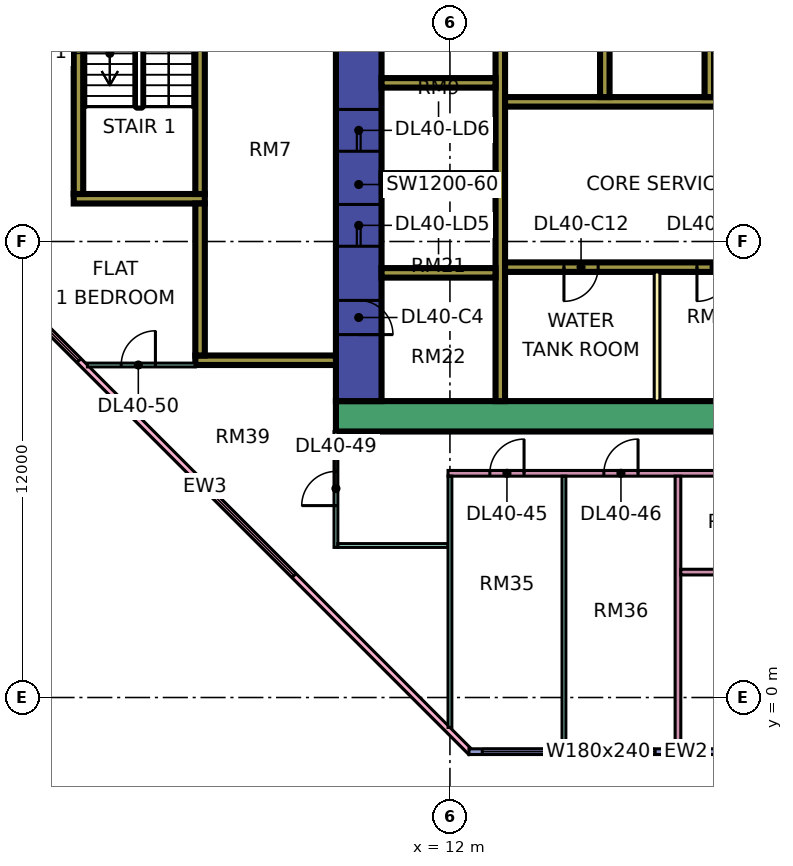
"""IFC4 building model, lengths in metres.
Left out: names, types, materials, properties, quantities, classifications, styles, units other than length and angle.
Written with IfcOpenShell. Run it as: python <this file> out.ifc"""

import sys

from ifc_helpers import new_model, si_unit, direction, frame, frame_2d, origin, place, context, subcontext, project, spatial, rectangle, extrude, element, fill, save


model = new_model("IFC4")
c1 = context("Model", 3, precision=1e-05, world=origin(), true_north=direction((0.0, 1.0)))
c2 = subcontext(c1, "Body", "Model", "MODEL_VIEW")
j1 = project(units=[si_unit("LENGTHUNIT", "METRE"), si_unit("PLANEANGLEUNIT", "RADIAN")], contexts=[c1])
p1 = place(None, origin())
s1 = spatial("IfcSite", under=j1, at=p1, CompositionType="ELEMENT")
p2 = place(p1, origin())
s2 = spatial("IfcBuilding", under=s1, at=p2, CompositionType="ELEMENT")
p3 = place(p2, frame((0.0, 0.0, 176.15)))
s3 = spatial("IfcBuildingStorey", under=s2, at=p3, CompositionType="ELEMENT", Elevation=176.15)
p4 = place(p3, frame((9.0, 7.4, 0.0), z_axis=(0.0, 0.0, 1.0), x_axis=(1.0, 0.0, 0.0)))
e1 = element("IfcWall", 1, at=p4, inside=s3, PredefinedType="SHEAR", context=c2, shape_type="SweptSolid", body=[
    extrude(rectangle(XDim=25.0, YDim=0.8, at=frame_2d((12.5, 0.0))), origin(), (0.0, 0.0, 1.0), 3.75),
])
p5 = place(p3, frame((9.6, 7.8, 0.0), z_axis=(0.0, 0.0, 1.0), x_axis=(0.0, 1.0, 0.0)))
e2 = element("IfcWall", 2, at=p5, inside=s3, PredefinedType="SHEAR", context=c2, shape_type="SweptSolid", body=[
    extrude(rectangle(XDim=11.4, YDim=1.2, at=frame_2d((5.7, 0.0))), origin(), (0.0, 0.0, 1.0), 3.75),
])
p6 = place(p5, frame((4.075, 0.0, 0.0)))
e3 = element("IfcOpeningElement", 3, at=p6, cuts=e2, PredefinedType="OPENING", context=c2, shape_type="SweptSolid", body=[
    extrude(rectangle(XDim=1.1, YDim=2.2, at=frame_2d((0.55, 1.1))), frame((0.0, 0.61, 0.0), z_axis=(0.0, -1.0, 0.0), x_axis=(1.0, 0.0, 0.0)), (0.0, 0.0, 1.0), 1.22),
])
p7 = place(p5, frame((6.575, 0.0, 0.0)))
e4 = element("IfcOpeningElement", 4, at=p7, cuts=e2, PredefinedType="OPENING", context=c2, shape_type="SweptSolid", body=[
    extrude(rectangle(XDim=1.1, YDim=2.2, at=frame_2d((0.55, 1.1))), frame((0.0, 0.61, 0.0), z_axis=(0.0, -1.0, 0.0), x_axis=(1.0, 0.0, 0.0)), (0.0, 0.0, 1.0), 1.22),
])
p8 = place(p5, frame((9.4, 0.0, 0.0)))
e5 = element("IfcOpeningElement", 5, at=p8, cuts=e2, PredefinedType="OPENING", context=c2, shape_type="SweptSolid", body=[
    extrude(rectangle(XDim=1.1, YDim=2.2, at=frame_2d((0.55, 1.1))), frame((0.0, 0.61, 0.0), z_axis=(0.0, -1.0, 0.0), x_axis=(1.0, 0.0, 0.0)), (0.0, 0.0, 1.0), 1.22),
])
p9 = place(p5, frame((1.75, 0.0, 0.0)))
e6 = element("IfcOpeningElement", 6, at=p9, cuts=e2, PredefinedType="OPENING", context=c2, shape_type="SweptSolid", body=[
    extrude(rectangle(XDim=0.9, YDim=2.1, at=frame_2d((0.45, 1.05))), frame((0.0, 0.61, 0.0), z_axis=(0.0, -1.0, 0.0), x_axis=(1.0, 0.0, 0.0)), (0.0, 0.0, 1.0), 1.22),
])
p10 = place(p3, frame((13.325, 7.8, 0.0), z_axis=(0.0, 0.0, 1.0), x_axis=(0.0, 1.0, 0.0)))
e7 = element("IfcWall", 7, at=p10, inside=s3, PredefinedType="SHEAR", context=c2, shape_type="SweptSolid", body=[
    extrude(rectangle(XDim=11.4, YDim=0.25, at=frame_2d((5.7, 0.0))), origin(), (0.0, 0.0, 1.0), 3.75),
])
p11 = place(p3, frame((13.45, 11.325, 0.0), z_axis=(0.0, 0.0, 1.0), x_axis=(1.0, 0.0, 0.0)))
e8 = element("IfcWall", 8, at=p11, inside=s3, PredefinedType="SHEAR", context=c2, shape_type="SweptSolid", body=[
    extrude(rectangle(XDim=19.75, YDim=0.25, at=frame_2d((9.875, 0.0))), origin(), (0.0, 0.0, 1.0), 3.75),
])
p12 = place(p11, frame((11.65, 0.0, 0.0)))
e9 = element("IfcOpeningElement", 9, at=p12, cuts=e8, PredefinedType="OPENING", context=c2, shape_type="SweptSolid", body=[
    extrude(rectangle(XDim=1.2, YDim=2.2, at=frame_2d((0.6, 1.1))), frame((0.0, 0.135, 0.0), z_axis=(0.0, -1.0, 0.0), x_axis=(1.0, 0.0, 0.0)), (0.0, 0.0, 1.0), 0.27),
])
p13 = place(p11, frame((14.4, 0.0, 0.0)))
e10 = element("IfcOpeningElement", 10, at=p13, cuts=e8, PredefinedType="OPENING", context=c2, shape_type="SweptSolid", body=[
    extrude(rectangle(XDim=1.2, YDim=2.2, at=frame_2d((0.6, 1.1))), frame((0.0, 0.135, 0.0), z_axis=(0.0, -1.0, 0.0), x_axis=(1.0, 0.0, 0.0)), (0.0, 0.0, 1.0), 0.27),
])
p14 = place(p11, frame((17.15, 0.0, 0.0)))
e11 = element("IfcOpeningElement", 11, at=p14, cuts=e8, PredefinedType="OPENING", context=c2, shape_type="SweptSolid", body=[
    extrude(rectangle(XDim=1.2, YDim=2.2, at=frame_2d((0.6, 1.1))), frame((0.0, 0.135, 0.0), z_axis=(0.0, -1.0, 0.0), x_axis=(1.0, 0.0, 0.0)), (0.0, 0.0, 1.0), 0.27),
])
p15 = place(p11, frame((1.55, 0.0, 0.0)))
e12 = element("IfcOpeningElement", 12, at=p15, cuts=e8, PredefinedType="OPENING", context=c2, shape_type="SweptSolid", body=[
    extrude(rectangle(XDim=0.9, YDim=2.1, at=frame_2d((0.45, 1.05))), frame((0.0, 0.135, 0.0), z_axis=(0.0, -1.0, 0.0), x_axis=(1.0, 0.0, 0.0)), (0.0, 0.0, 1.0), 0.27),
])
p16 = place(p11, frame((5.05, 0.0, 0.0)))
e13 = element("IfcOpeningElement", 13, at=p16, cuts=e8, PredefinedType="OPENING", context=c2, shape_type="SweptSolid", body=[
    extrude(rectangle(XDim=0.9, YDim=2.1, at=frame_2d((0.45, 1.05))), frame((0.0, 0.135, 0.0), z_axis=(0.0, -1.0, 0.0), x_axis=(1.0, 0.0, 0.0)), (0.0, 0.0, 1.0), 0.27),
])
p17 = place(p11, frame((8.425, 0.0, 0.0)))
e14 = element("IfcOpeningElement", 14, at=p17, cuts=e8, PredefinedType="OPENING", context=c2, shape_type="SweptSolid", body=[
    extrude(rectangle(XDim=0.9, YDim=2.1, at=frame_2d((0.45, 1.05))), frame((0.0, 0.135, 0.0), z_axis=(0.0, -1.0, 0.0), x_axis=(1.0, 0.0, 0.0)), (0.0, 0.0, 1.0), 0.27),
])
p18 = place(p3, frame((13.45, 15.675, 0.0), z_axis=(0.0, 0.0, 1.0), x_axis=(1.0, 0.0, 0.0)))
e15 = element("IfcWall", 15, at=p18, inside=s3, PredefinedType="SHEAR", context=c2, shape_type="SweptSolid", body=[
    extrude(rectangle(XDim=13.75, YDim=0.25, at=frame_2d((6.875, 0.0))), origin(), (0.0, 0.0, 1.0), 3.75),
])
p19 = place(p18, frame((11.65, 0.0, 0.0)))
e16 = element("IfcOpeningElement", 16, at=p19, cuts=e15, PredefinedType="OPENING", context=c2, shape_type="SweptSolid", body=[
    extrude(rectangle(XDim=1.2, YDim=2.2, at=frame_2d((0.6, 1.1))), frame((0.0, 0.135, 0.0), z_axis=(0.0, -1.0, 0.0), x_axis=(1.0, 0.0, 0.0)), (0.0, 0.0, 1.0), 0.27),
])
for number, where, z_axis, x_axis in (
    (17, (10.2, 11.175, 0.0), (0.0, 0.0, 1.0), (1.0, 0.0, 0.0)),
    (18, (10.2, 13.675, 0.0), (0.0, 0.0, 1.0), (1.0, 0.0, 0.0)),
    (19, (10.2, 16.175, 0.0), (0.0, 0.0, 1.0), (1.0, 0.0, 0.0)),
):
    element("IfcWall", number, at=place(p3, frame(where, z_axis=z_axis, x_axis=x_axis)), inside=s3, PredefinedType="SHEAR", context=c2, shape_type="SweptSolid", body=[
        extrude(rectangle(XDim=3.0, YDim=0.25, at=frame_2d((1.5, 0.0))), origin(), (0.0, 0.0, 1.0), 3.75),
    ])
for number, where, z_axis, x_axis in (
    (20, (16.075, 15.8, 0.0), (0.0, 0.0, 1.0), (0.0, 1.0, 0.0)),
    (21, (18.825, 15.8, 0.0), (0.0, 0.0, 1.0), (0.0, 1.0, 0.0)),
):
    element("IfcWall", number, at=place(p3, frame(where, z_axis=z_axis, x_axis=x_axis)), inside=s3, PredefinedType="SHEAR", context=c2, shape_type="SweptSolid", body=[
        extrude(rectangle(XDim=3.4, YDim=0.25, at=frame_2d((1.7, 0.0))), origin(), (0.0, 0.0, 1.0), 3.75),
    ])
p20 = place(p3, frame((2.1, 13.125, 0.0), z_axis=(0.0, 0.0, 1.0), x_axis=(1.0, 0.0, 0.0)))
e22 = element("IfcWall", 22, at=p20, inside=s3, PredefinedType="SHEAR", context=c2, shape_type="SweptSolid", body=[
    extrude(rectangle(XDim=3.45, YDim=0.25, at=frame_2d((1.725, 0.0))), origin(), (0.0, 0.0, 1.0), 3.75),
])
p21 = place(p3, frame((2.225, 13.25, 0.0), z_axis=(0.0, 0.0, 1.0), x_axis=(0.0, 1.0, 0.0)))
e23 = element("IfcWall", 23, at=p21, inside=s3, PredefinedType="SHEAR", context=c2, shape_type="SweptSolid", body=[
    extrude(rectangle(XDim=6.5, YDim=0.25, at=frame_2d((3.25, 0.0))), origin(), (0.0, 0.0, 1.0), 3.75),
])
p22 = place(p3, frame((5.425, 13.25, 0.0), z_axis=(0.0, 0.0, 1.0), x_axis=(0.0, 1.0, 0.0)))
e24 = element("IfcWall", 24, at=p22, inside=s3, PredefinedType="SHEAR", context=c2, shape_type="SweptSolid", body=[
    extrude(rectangle(XDim=6.5, YDim=0.25, at=frame_2d((3.25, 0.0))), origin(), (0.0, 0.0, 1.0), 3.75),
])
p23 = place(p22, frame((5.25, 0.0, 0.0)))
e25 = element("IfcOpeningElement", 25, at=p23, cuts=e24, PredefinedType="OPENING", context=c2, shape_type="SweptSolid", body=[
    extrude(rectangle(XDim=1.1, YDim=2.2, at=frame_2d((0.55, 1.1))), frame((0.0, 0.135, 0.0), z_axis=(0.0, -1.0, 0.0), x_axis=(1.0, 0.0, 0.0)), (0.0, 0.0, 1.0), 0.27),
])
p24 = place(p3, frame((5.3, 8.875, 0.0), z_axis=(0.0, 0.0, 1.0), x_axis=(1.0, 0.0, 0.0)))
e26 = element("IfcWall", 26, at=p24, inside=s3, PredefinedType="SHEAR", context=c2, shape_type="SweptSolid", body=[
    extrude(rectangle(XDim=3.7, YDim=0.25, at=frame_2d((1.85, 0.0))), origin(), (0.0, 0.0, 1.0), 3.75),
])
p25 = place(p3, frame((5.425, 9.0, 0.0), z_axis=(0.0, 0.0, 1.0), x_axis=(0.0, 1.0, 0.0)))
e27 = element("IfcWall", 27, at=p25, inside=s3, PredefinedType="SHEAR", context=c2, shape_type="SweptSolid", body=[
    extrude(rectangle(XDim=4.0, YDim=0.25, at=frame_2d((2.0, 0.0))), origin(), (0.0, 0.0, 1.0), 3.75),
])
p26 = place(p3, frame((-1.447, 12.553, 0.0), z_axis=(0.0, 0.0, 1.0), x_axis=(0.707106781187, -0.707106781187, 0.0)))
e28 = element("IfcWall", 28, at=p26, inside=s3, PredefinedType="SOLIDWALL", context=c2, shape_type="SweptSolid", body=[
    extrude(rectangle(XDim=19.799, YDim=0.15, at=frame_2d((9.899, 0.0))), origin(), (0.0, 0.0, 1.0), 3.35),
])
p27 = place(p26, frame((2.212, 0.0, 0.45)))
e29 = element("IfcOpeningElement", 29, at=p27, cuts=e28, PredefinedType="OPENING", context=c2, shape_type="SweptSolid", body=[
    extrude(rectangle(XDim=3.0, YDim=2.4, at=frame_2d((1.5, 1.2))), frame((0.0, 0.085, 0.0), z_axis=(0.0, -1.0, 0.0), x_axis=(1.0, 0.0, 0.0)), (0.0, 0.0, 1.0), 0.17),
])
p28 = place(p26, frame((10.216, 0.0, 0.45)))
e30 = element("IfcOpeningElement", 30, at=p28, cuts=e28, PredefinedType="OPENING", context=c2, shape_type="SweptSolid", body=[
    extrude(rectangle(XDim=3.0, YDim=2.4, at=frame_2d((1.5, 1.2))), frame((0.0, 0.085, 0.0), z_axis=(0.0, -1.0, 0.0), x_axis=(1.0, 0.0, 0.0)), (0.0, 0.0, 1.0), 0.17),
])
p29 = place(p3, frame((12.5, -1.425, 0.0), z_axis=(0.0, 0.0, 1.0), x_axis=(1.0, 0.0, 0.0)))
e31 = element("IfcWall", 31, at=p29, inside=s3, PredefinedType="SOLIDWALL", context=c2, shape_type="SweptSolid", body=[
    extrude(rectangle(XDim=11.425, YDim=0.15, at=frame_2d((5.712, 0.0))), origin(), (0.0, 0.0, 1.0), 3.35),
])
p30 = place(p29, frame((0.35, 0.0, 0.45)))
e32 = element("IfcOpeningElement", 32, at=p30, cuts=e31, PredefinedType="OPENING", context=c2, shape_type="SweptSolid", body=[
    extrude(rectangle(XDim=1.8, YDim=2.4, at=frame_2d((0.9, 1.2))), frame((0.0, 0.085, 0.0), z_axis=(0.0, -1.0, 0.0), x_axis=(1.0, 0.0, 0.0)), (0.0, 0.0, 1.0), 0.17),
])
p31 = place(p29, frame((3.1, 0.0, 0.45)))
e33 = element("IfcOpeningElement", 33, at=p31, cuts=e31, PredefinedType="OPENING", context=c2, shape_type="SweptSolid", body=[
    extrude(rectangle(XDim=1.8, YDim=2.4, at=frame_2d((0.9, 1.2))), frame((0.0, 0.085, 0.0), z_axis=(0.0, -1.0, 0.0), x_axis=(1.0, 0.0, 0.0)), (0.0, 0.0, 1.0), 0.17),
])
p32 = place(p29, frame((6.962, 0.0, 0.45)))
e34 = element("IfcOpeningElement", 34, at=p32, cuts=e31, PredefinedType="OPENING", context=c2, shape_type="SweptSolid", body=[
    extrude(rectangle(XDim=3.0, YDim=2.4, at=frame_2d((1.5, 1.2))), frame((0.0, 0.085, 0.0), z_axis=(0.0, -1.0, 0.0), x_axis=(1.0, 0.0, 0.0)), (0.0, 0.0, 1.0), 0.17),
])
p33 = place(p3, frame((17.45, 7.8, 0.0), z_axis=(0.0, 0.0, 1.0), x_axis=(0.0, 1.0, 0.0)))
e35 = element("IfcWall", 35, at=p33, inside=s3, PredefinedType="PARTITIONING", context=c2, shape_type="SweptSolid", body=[
    extrude(rectangle(XDim=3.4, YDim=0.15, at=frame_2d((1.7, 0.0))), origin(), (0.0, 0.0, 1.0), 3.35),
])
p34 = place(p3, frame((2.461, 8.75, 0.0), z_axis=(0.0, 0.0, 1.0), x_axis=(1.0, 0.0, 0.0)))
e36 = element("IfcWall", 36, at=p34, inside=s3, PredefinedType="PARTITIONING", context=c2, shape_type="SweptSolid", body=[
    extrude(rectangle(XDim=2.839, YDim=0.1, at=frame_2d((1.419, 0.0))), origin(), (0.0, 0.0, 1.0), 3.35),
])
p35 = place(p34, frame((0.889, 0.0, 0.0)))
e37 = element("IfcOpeningElement", 37, at=p35, cuts=e36, PredefinedType="OPENING", context=c2, shape_type="SweptSolid", body=[
    extrude(rectangle(XDim=0.9, YDim=2.1, at=frame_2d((0.45, 1.05))), frame((0.0, 0.06, 0.0), z_axis=(0.0, -1.0, 0.0), x_axis=(1.0, 0.0, 0.0)), (0.0, 0.0, 1.0), 0.12),
])
p36 = place(p3, frame((9.0, 3.95, 0.0), z_axis=(0.0, 0.0, 1.0), x_axis=(0.0, 1.0, 0.0)))
e38 = element("IfcWall", 38, at=p36, inside=s3, PredefinedType="PARTITIONING", context=c2, shape_type="SweptSolid", body=[
    extrude(rectangle(XDim=3.05, YDim=0.1, at=frame_2d((1.525, 0.0))), origin(), (0.0, 0.0, 1.0), 3.35),
])
p37 = place(p36, frame((1.1, 0.0, 0.0)))
e39 = element("IfcOpeningElement", 39, at=p37, cuts=e38, PredefinedType="OPENING", context=c2, shape_type="SweptSolid", body=[
    extrude(rectangle(XDim=0.9, YDim=2.1, at=frame_2d((0.45, 1.05))), frame((0.0, 0.06, 0.0), z_axis=(0.0, -1.0, 0.0), x_axis=(1.0, 0.0, 0.0)), (0.0, 0.0, 1.0), 0.12),
])
p38 = place(p3, frame((9.05, 4.0, 0.0), z_axis=(0.0, 0.0, 1.0), x_axis=(1.0, 0.0, 0.0)))
e40 = element("IfcWall", 40, at=p38, inside=s3, PredefinedType="PARTITIONING", context=c2, shape_type="SweptSolid", body=[
    extrude(rectangle(XDim=2.9, YDim=0.1, at=frame_2d((1.45, 0.0))), origin(), (0.0, 0.0, 1.0), 3.35),
])
p39 = place(p3, frame((11.95, 5.9, 0.0), z_axis=(0.0, 0.0, 1.0), x_axis=(1.0, 0.0, 0.0)))
e41 = element("IfcWall", 41, at=p39, inside=s3, PredefinedType="PARTITIONING", context=c2, shape_type="SweptSolid", body=[
    extrude(rectangle(XDim=21.1, YDim=0.15, at=frame_2d((10.55, 0.0))), origin(), (0.0, 0.0, 1.0), 3.35),
])
p40 = place(p39, frame((1.1, 0.0, 0.0)))
e42 = element("IfcOpeningElement", 42, at=p40, cuts=e41, PredefinedType="OPENING", context=c2, shape_type="SweptSolid", body=[
    extrude(rectangle(XDim=0.9, YDim=2.1, at=frame_2d((0.45, 1.05))), frame((0.0, 0.085, 0.0), z_axis=(0.0, -1.0, 0.0), x_axis=(1.0, 0.0, 0.0)), (0.0, 0.0, 1.0), 0.17),
])
p41 = place(p39, frame((4.1, 0.0, 0.0)))
e43 = element("IfcOpeningElement", 43, at=p41, cuts=e41, PredefinedType="OPENING", context=c2, shape_type="SweptSolid", body=[
    extrude(rectangle(XDim=0.9, YDim=2.1, at=frame_2d((0.45, 1.05))), frame((0.0, 0.085, 0.0), z_axis=(0.0, -1.0, 0.0), x_axis=(1.0, 0.0, 0.0)), (0.0, 0.0, 1.0), 0.17),
])
p42 = place(p39, frame((10.1, 0.0, 0.0)))
e44 = element("IfcOpeningElement", 44, at=p42, cuts=e41, PredefinedType="OPENING", context=c2, shape_type="SweptSolid", body=[
    extrude(rectangle(XDim=0.9, YDim=2.1, at=frame_2d((0.45, 1.05))), frame((0.0, 0.085, 0.0), z_axis=(0.0, -1.0, 0.0), x_axis=(1.0, 0.0, 0.0)), (0.0, 0.0, 1.0), 0.17),
])
p43 = place(p39, frame((16.1, 0.0, 0.0)))
e45 = element("IfcOpeningElement", 45, at=p43, cuts=e41, PredefinedType="OPENING", context=c2, shape_type="SweptSolid", body=[
    extrude(rectangle(XDim=0.9, YDim=2.1, at=frame_2d((0.45, 1.05))), frame((0.0, 0.085, 0.0), z_axis=(0.0, -1.0, 0.0), x_axis=(1.0, 0.0, 0.0)), (0.0, 0.0, 1.0), 0.17),
])
p44 = place(p3, frame((12.0, -0.788, 0.0), z_axis=(0.0, 0.0, 1.0), x_axis=(0.0, 1.0, 0.0)))
e46 = element("IfcWall", 46, at=p44, inside=s3, PredefinedType="PARTITIONING", context=c2, shape_type="SweptSolid", body=[
    extrude(rectangle(XDim=6.613, YDim=0.1, at=frame_2d((3.306, 0.0))), origin(), (0.0, 0.0, 1.0), 3.35),
])
p45 = place(p3, frame((15.0, -1.351, 0.0), z_axis=(0.0, 0.0, 1.0), x_axis=(0.0, 1.0, 0.0)))
e47 = element("IfcWall", 47, at=p45, inside=s3, PredefinedType="PARTITIONING", context=c2, shape_type="SweptSolid", body=[
    extrude(rectangle(XDim=7.176, YDim=0.1, at=frame_2d((3.588, 0.0))), origin(), (0.0, 0.0, 1.0), 3.35),
])
p46 = place(p3, frame((18.0, -1.351, 0.0), z_axis=(0.0, 0.0, 1.0), x_axis=(0.0, 1.0, 0.0)))
e48 = element("IfcWall", 48, at=p46, inside=s3, PredefinedType="PARTITIONING", context=c2, shape_type="SweptSolid", body=[
    extrude(rectangle(XDim=7.176, YDim=0.15, at=frame_2d((3.588, 0.0))), origin(), (0.0, 0.0, 1.0), 3.35),
])
p47 = place(p3, frame((18.075, 3.3, 0.0), z_axis=(0.0, 0.0, 1.0), x_axis=(1.0, 0.0, 0.0)))
e49 = element("IfcWall", 49, at=p47, inside=s3, PredefinedType="PARTITIONING", context=c2, shape_type="SweptSolid", body=[
    extrude(rectangle(XDim=3.0, YDim=0.15, at=frame_2d((1.5, 0.0))), origin(), (0.0, 0.0, 1.0), 3.35),
])
p48 = place(p27, origin())
e50 = element("IfcWindow", 50, at=p48, inside=s3, PartitioningType="SINGLE_PANEL", PredefinedType="WINDOW", context=c2, shape_type="SweptSolid", body=[
    extrude(rectangle(XDim=3.0, YDim=2.4, at=frame_2d((1.5, 1.2))), frame((0.0, 0.03, 0.0), z_axis=(0.0, -1.0, 0.0), x_axis=(1.0, 0.0, 0.0)), (0.0, 0.0, 1.0), 0.06),
])
fill(e29, e50)
p49 = place(p28, origin())
e51 = element("IfcWindow", 51, at=p49, inside=s3, PartitioningType="SINGLE_PANEL", PredefinedType="WINDOW", context=c2, shape_type="SweptSolid", body=[
    extrude(rectangle(XDim=3.0, YDim=2.4, at=frame_2d((1.5, 1.2))), frame((0.0, 0.03, 0.0), z_axis=(0.0, -1.0, 0.0), x_axis=(1.0, 0.0, 0.0)), (0.0, 0.0, 1.0), 0.06),
])
fill(e30, e51)
p50 = place(p30, origin())
e52 = element("IfcWindow", 52, at=p50, inside=s3, PartitioningType="SINGLE_PANEL", PredefinedType="WINDOW", context=c2, shape_type="SweptSolid", body=[
    extrude(rectangle(XDim=1.8, YDim=2.4, at=frame_2d((0.9, 1.2))), frame((0.0, 0.03, 0.0), z_axis=(0.0, -1.0, 0.0), x_axis=(1.0, 0.0, 0.0)), (0.0, 0.0, 1.0), 0.06),
])
fill(e32, e52)
p51 = place(p31, origin())
e53 = element("IfcWindow", 53, at=p51, inside=s3, PartitioningType="SINGLE_PANEL", PredefinedType="WINDOW", context=c2, shape_type="SweptSolid", body=[
    extrude(rectangle(XDim=1.8, YDim=2.4, at=frame_2d((0.9, 1.2))), frame((0.0, 0.03, 0.0), z_axis=(0.0, -1.0, 0.0), x_axis=(1.0, 0.0, 0.0)), (0.0, 0.0, 1.0), 0.06),
])
fill(e33, e53)
p52 = place(p6, origin())
e54 = element("IfcDoor", 54, at=p52, inside=s3, OperationType="DOUBLE_DOOR_SLIDING", PredefinedType="DOOR", context=c2, shape_type="SweptSolid", body=[
    extrude(rectangle(XDim=1.1, YDim=2.2, at=frame_2d((0.55, 1.1))), frame((0.0, 0.025, 0.0), z_axis=(0.0, -1.0, 0.0), x_axis=(1.0, 0.0, 0.0)), (0.0, 0.0, 1.0), 0.05),
])
fill(e3, e54)
p53 = place(p7, origin())
e55 = element("IfcDoor", 55, at=p53, inside=s3, OperationType="DOUBLE_DOOR_SLIDING", PredefinedType="DOOR", context=c2, shape_type="SweptSolid", body=[
    extrude(rectangle(XDim=1.1, YDim=2.2, at=frame_2d((0.55, 1.1))), frame((0.0, 0.025, 0.0), z_axis=(0.0, -1.0, 0.0), x_axis=(1.0, 0.0, 0.0)), (0.0, 0.0, 1.0), 0.05),
])
fill(e4, e55)
p54 = place(p9, frame((0.9, 0.0, 0.0), z_axis=(0.0, 0.0, 1.0), x_axis=(-1.0, 0.0, 0.0)))
e56 = element("IfcDoor", 56, at=p54, inside=s3, OperationType="SINGLE_SWING_LEFT", PredefinedType="DOOR", context=c2, shape_type="SweptSolid", body=[
    extrude(rectangle(XDim=0.9, YDim=2.1, at=frame_2d((0.45, 1.05))), frame((0.0, 0.025, 0.0), z_axis=(0.0, -1.0, 0.0), x_axis=(1.0, 0.0, 0.0)), (0.0, 0.0, 1.0), 0.05),
])
fill(e6, e56)
p55 = place(p15, frame((0.9, 0.0, 0.0), z_axis=(0.0, 0.0, 1.0), x_axis=(-1.0, 0.0, 0.0)))
e57 = element("IfcDoor", 57, at=p55, inside=s3, OperationType="SINGLE_SWING_LEFT", PredefinedType="DOOR", context=c2, shape_type="SweptSolid", body=[
    extrude(rectangle(XDim=0.9, YDim=2.1, at=frame_2d((0.45, 1.05))), frame((0.0, 0.025, 0.0), z_axis=(0.0, -1.0, 0.0), x_axis=(1.0, 0.0, 0.0)), (0.0, 0.0, 1.0), 0.05),
])
fill(e12, e57)
p56 = place(p16, frame((0.9, 0.0, 0.0), z_axis=(0.0, 0.0, 1.0), x_axis=(-1.0, 0.0, 0.0)))
e58 = element("IfcDoor", 58, at=p56, inside=s3, OperationType="SINGLE_SWING_LEFT", PredefinedType="DOOR", context=c2, shape_type="SweptSolid", body=[
    extrude(rectangle(XDim=0.9, YDim=2.1, at=frame_2d((0.45, 1.05))), frame((0.0, 0.025, 0.0), z_axis=(0.0, -1.0, 0.0), x_axis=(1.0, 0.0, 0.0)), (0.0, 0.0, 1.0), 0.05),
])
fill(e13, e58)
p57 = place(p40, frame((0.9, 0.0, 0.0), z_axis=(0.0, 0.0, 1.0), x_axis=(-1.0, 0.0, 0.0)))
e59 = element("IfcDoor", 59, at=p57, inside=s3, OperationType="SINGLE_SWING_RIGHT", PredefinedType="DOOR", context=c2, shape_type="SweptSolid", body=[
    extrude(rectangle(XDim=0.9, YDim=2.1, at=frame_2d((0.45, 1.05))), frame((0.0, 0.025, 0.0), z_axis=(0.0, -1.0, 0.0), x_axis=(1.0, 0.0, 0.0)), (0.0, 0.0, 1.0), 0.05),
])
fill(e42, e59)
p58 = place(p41, frame((0.9, 0.0, 0.0), z_axis=(0.0, 0.0, 1.0), x_axis=(-1.0, 0.0, 0.0)))
e60 = element("IfcDoor", 60, at=p58, inside=s3, OperationType="SINGLE_SWING_RIGHT", PredefinedType="DOOR", context=c2, shape_type="SweptSolid", body=[
    extrude(rectangle(XDim=0.9, YDim=2.1, at=frame_2d((0.45, 1.05))), frame((0.0, 0.025, 0.0), z_axis=(0.0, -1.0, 0.0), x_axis=(1.0, 0.0, 0.0)), (0.0, 0.0, 1.0), 0.05),
])
fill(e43, e60)
p59 = place(p37, origin())
e61 = element("IfcDoor", 61, at=p59, inside=s3, OperationType="SINGLE_SWING_LEFT", PredefinedType="DOOR", context=c2, shape_type="SweptSolid", body=[
    extrude(rectangle(XDim=0.9, YDim=2.1, at=frame_2d((0.45, 1.05))), frame((0.0, 0.025, 0.0), z_axis=(0.0, -1.0, 0.0), x_axis=(1.0, 0.0, 0.0)), (0.0, 0.0, 1.0), 0.05),
])
fill(e39, e61)
p60 = place(p35, frame((0.9, 0.0, 0.0), z_axis=(0.0, 0.0, 1.0), x_axis=(-1.0, 0.0, 0.0)))
e62 = element("IfcDoor", 62, at=p60, inside=s3, OperationType="SINGLE_SWING_RIGHT", PredefinedType="DOOR", context=c2, shape_type="SweptSolid", body=[
    extrude(rectangle(XDim=0.9, YDim=2.1, at=frame_2d((0.45, 1.05))), frame((0.0, 0.025, 0.0), z_axis=(0.0, -1.0, 0.0), x_axis=(1.0, 0.0, 0.0)), (0.0, 0.0, 1.0), 0.05),
])
fill(e37, e62)
save(model, sys.argv[1])
